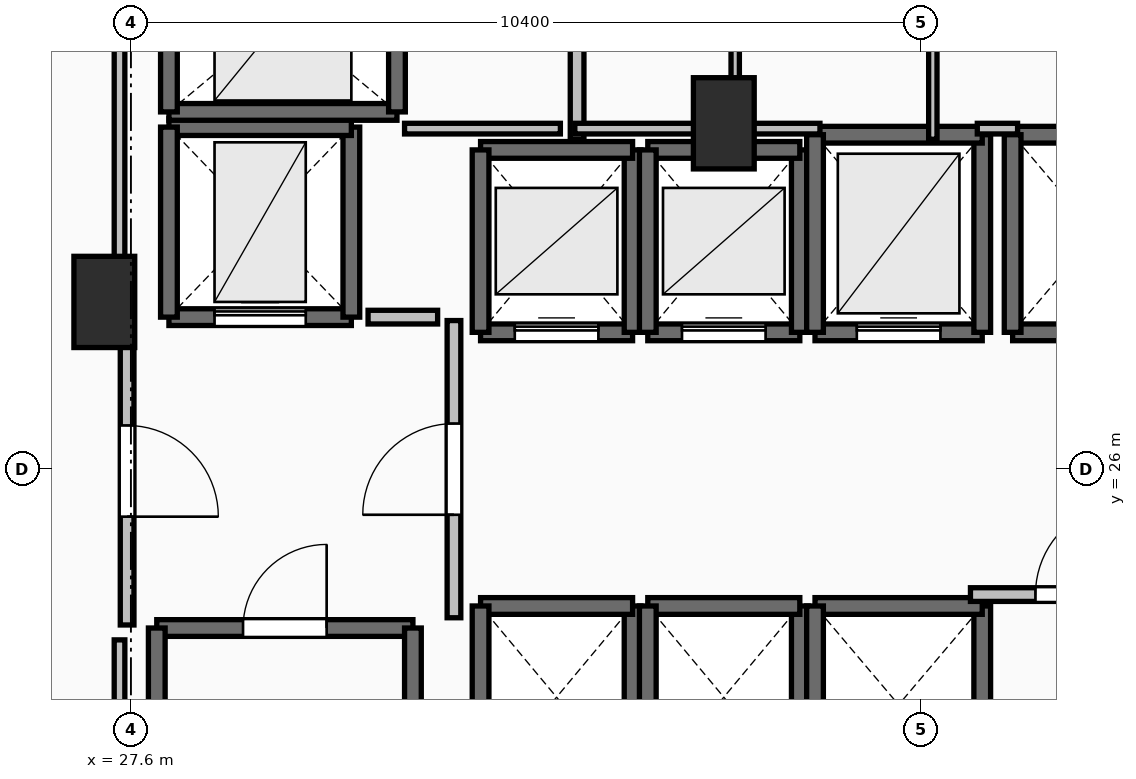
"""IFC4 building model, lengths in metres.
Left out: names, types, materials, properties, quantities, classifications, styles, units other than length and angle.
Written with IfcOpenShell. Run it as: python <this file> out.ifc"""

import sys

from ifc_helpers import new_model, si_unit, direction, frame, frame_2d, origin, origin_2d, place, context, subcontext, project, spatial, rectangle, extrude, element, fill, save


model = new_model("IFC4")
c1 = context("Model", 3, precision=1e-05, world=origin(), true_north=direction((0.0, 1.0)))
c2 = subcontext(c1, "Body", "Model", "MODEL_VIEW")
j1 = project(units=[si_unit("LENGTHUNIT", "METRE"), si_unit("PLANEANGLEUNIT", "RADIAN")], contexts=[c1])
p1 = place(None, origin())
s1 = spatial("IfcSite", under=j1, at=p1, CompositionType="ELEMENT")
p2 = place(p1, origin())
s2 = spatial("IfcBuilding", under=s1, at=p2, CompositionType="ELEMENT")
p3 = place(p2, frame((0.0, 0.0, 99.8)))
s3 = spatial("IfcBuildingStorey", under=s2, at=p3, CompositionType="ELEMENT", Elevation=99.8)
for number, where, z_axis, x_axis in (
    (1, (27.25, 28.2, 0.0), (0.0, 0.0, 1.0), (1.0, 0.0, 0.0)),
    (2, (35.4, 30.55, 0.0), (0.0, 0.0, 1.0), (1.0, 0.0, 0.0)),
):
    element("IfcColumn", number, at=place(p3, frame(where, z_axis=z_axis, x_axis=x_axis)), inside=s3, PredefinedType="PILASTER", context=c2, shape_type="SweptSolid", body=[
        extrude(rectangle(XDim=0.8, YDim=1.2, at=origin_2d()), origin(), (0.0, 0.0, 1.0), 3.5),
    ])
p4 = place(p3, frame((27.94, 23.91, 0.0), z_axis=(0.0, 0.0, 1.0), x_axis=(1.0, 0.0, 0.0)))
e3 = element("IfcWall", 3, at=p4, inside=s3, PredefinedType="SOLIDWALL", context=c2, shape_type="SweptSolid", body=[
    extrude(rectangle(XDim=3.37, YDim=0.22, at=frame_2d((1.685, 0.0))), origin(), (0.0, 0.0, 1.0), 3.24),
])
p5 = place(p4, frame((1.135, 0.0, 0.0)))
e4 = element("IfcOpeningElement", 4, at=p5, cuts=e3, PredefinedType="OPENING", context=c2, shape_type="SweptSolid", body=[
    extrude(rectangle(XDim=1.1, YDim=2.15, at=frame_2d((0.55, 1.075))), frame((0.0, 0.125, 0.0), z_axis=(0.0, -1.0, 0.0), x_axis=(1.0, 0.0, 0.0)), (0.0, 0.0, 1.0), 0.25),
])
for number, where, z_axis, x_axis in (
    (5, (31.31, 23.91, 0.0), (0.0, 0.0, 1.0), (0.0, -1.0, 0.0)),
    (6, (27.94, 16.49, 0.0), (0.0, 0.0, 1.0), (0.0, 1.0, 0.0)),
):
    element("IfcWall", number, at=place(p3, frame(where, z_axis=z_axis, x_axis=x_axis)), inside=s3, PredefinedType="SOLIDWALL", context=c2, shape_type="SweptSolid", body=[
        extrude(rectangle(XDim=7.42, YDim=0.22, at=frame_2d((3.71, 0.0))), origin(), (0.0, 0.0, 1.0), 3.24),
    ])
p6 = place(p3, frame((32.2, 27.8, 0.0), z_axis=(0.0, 0.0, 1.0), x_axis=(1.0, 0.0, 0.0)))
e7 = element("IfcWall", 7, at=p6, inside=s3, PredefinedType="SOLIDWALL", context=c2, shape_type="SweptSolid", body=[
    extrude(rectangle(XDim=2.0, YDim=0.22, at=frame_2d((1.0, 0.0))), origin(), (0.0, 0.0, 1.0), 3.24),
])
p7 = place(p6, frame((0.45, 0.0, 0.0)))
e8 = element("IfcOpeningElement", 8, at=p7, cuts=e7, PredefinedType="OPENING", context=c2, shape_type="SweptSolid", body=[
    extrude(rectangle(XDim=1.1, YDim=2.2, at=frame_2d((0.55, 1.1))), frame((0.0, 0.125, 0.0), z_axis=(0.0, -1.0, 0.0), x_axis=(1.0, 0.0, 0.0)), (0.0, 0.0, 1.0), 0.25),
])
p8 = place(p3, frame((34.2, 27.8, 0.0), z_axis=(0.0, 0.0, 1.0), x_axis=(0.0, 1.0, 0.0)))
e9 = element("IfcWall", 9, at=p8, inside=s3, PredefinedType="SOLIDWALL", context=c2, shape_type="SweptSolid", body=[
    extrude(rectangle(XDim=2.4, YDim=0.22, at=frame_2d((1.2, 0.0))), origin(), (0.0, 0.0, 1.0), 3.24),
])
p9 = place(p3, frame((34.2, 30.2, 0.0), z_axis=(0.0, 0.0, 1.0), x_axis=(-1.0, 0.0, 0.0)))
e10 = element("IfcWall", 10, at=p9, inside=s3, PredefinedType="SOLIDWALL", context=c2, shape_type="SweptSolid", body=[
    extrude(rectangle(XDim=2.0, YDim=0.22, at=frame_2d((1.0, 0.0))), origin(), (0.0, 0.0, 1.0), 3.24),
])
p10 = place(p3, frame((32.2, 30.2, 0.0), z_axis=(0.0, 0.0, 1.0), x_axis=(0.0, -1.0, 0.0)))
e11 = element("IfcWall", 11, at=p10, inside=s3, PredefinedType="SOLIDWALL", context=c2, shape_type="SweptSolid", body=[
    extrude(rectangle(XDim=2.4, YDim=0.22, at=frame_2d((1.2, 0.0))), origin(), (0.0, 0.0, 1.0), 3.24),
])
p11 = place(p3, frame((34.4, 27.8, 0.0), z_axis=(0.0, 0.0, 1.0), x_axis=(1.0, 0.0, 0.0)))
e12 = element("IfcWall", 12, at=p11, inside=s3, PredefinedType="SOLIDWALL", context=c2, shape_type="SweptSolid", body=[
    extrude(rectangle(XDim=2.0, YDim=0.22, at=frame_2d((1.0, 0.0))), origin(), (0.0, 0.0, 1.0), 3.24),
])
p12 = place(p11, frame((0.45, 0.0, 0.0)))
e13 = element("IfcOpeningElement", 13, at=p12, cuts=e12, PredefinedType="OPENING", context=c2, shape_type="SweptSolid", body=[
    extrude(rectangle(XDim=1.1, YDim=2.2, at=frame_2d((0.55, 1.1))), frame((0.0, 0.125, 0.0), z_axis=(0.0, -1.0, 0.0), x_axis=(1.0, 0.0, 0.0)), (0.0, 0.0, 1.0), 0.25),
])
p13 = place(p3, frame((36.4, 27.8, 0.0), z_axis=(0.0, 0.0, 1.0), x_axis=(0.0, 1.0, 0.0)))
e14 = element("IfcWall", 14, at=p13, inside=s3, PredefinedType="SOLIDWALL", context=c2, shape_type="SweptSolid", body=[
    extrude(rectangle(XDim=2.4, YDim=0.22, at=frame_2d((1.2, 0.0))), origin(), (0.0, 0.0, 1.0), 3.24),
])
p14 = place(p3, frame((36.4, 30.2, 0.0), z_axis=(0.0, 0.0, 1.0), x_axis=(-1.0, 0.0, 0.0)))
e15 = element("IfcWall", 15, at=p14, inside=s3, PredefinedType="SOLIDWALL", context=c2, shape_type="SweptSolid", body=[
    extrude(rectangle(XDim=2.0, YDim=0.22, at=frame_2d((1.0, 0.0))), origin(), (0.0, 0.0, 1.0), 3.24),
])
p15 = place(p3, frame((34.4, 30.2, 0.0), z_axis=(0.0, 0.0, 1.0), x_axis=(0.0, -1.0, 0.0)))
e16 = element("IfcWall", 16, at=p15, inside=s3, PredefinedType="SOLIDWALL", context=c2, shape_type="SweptSolid", body=[
    extrude(rectangle(XDim=2.4, YDim=0.22, at=frame_2d((1.2, 0.0))), origin(), (0.0, 0.0, 1.0), 3.24),
])
p16 = place(p3, frame((36.6, 27.8, 0.0), z_axis=(0.0, 0.0, 1.0), x_axis=(1.0, 0.0, 0.0)))
e17 = element("IfcWall", 17, at=p16, inside=s3, PredefinedType="SOLIDWALL", context=c2, shape_type="SweptSolid", body=[
    extrude(rectangle(XDim=2.2, YDim=0.22, at=frame_2d((1.1, 0.0))), origin(), (0.0, 0.0, 1.0), 3.24),
])
p17 = place(p16, frame((0.55, 0.0, 0.0)))
e18 = element("IfcOpeningElement", 18, at=p17, cuts=e17, PredefinedType="OPENING", context=c2, shape_type="SweptSolid", body=[
    extrude(rectangle(XDim=1.1, YDim=2.2, at=frame_2d((0.55, 1.1))), frame((0.0, 0.125, 0.0), z_axis=(0.0, -1.0, 0.0), x_axis=(1.0, 0.0, 0.0)), (0.0, 0.0, 1.0), 0.25),
])
p18 = place(p3, frame((38.8, 27.8, 0.0), z_axis=(0.0, 0.0, 1.0), x_axis=(0.0, 1.0, 0.0)))
e19 = element("IfcWall", 19, at=p18, inside=s3, PredefinedType="SOLIDWALL", context=c2, shape_type="SweptSolid", body=[
    extrude(rectangle(XDim=2.6, YDim=0.22, at=frame_2d((1.3, 0.0))), origin(), (0.0, 0.0, 1.0), 3.24),
])
p19 = place(p3, frame((38.8, 30.4, 0.0), z_axis=(0.0, 0.0, 1.0), x_axis=(-1.0, 0.0, 0.0)))
e20 = element("IfcWall", 20, at=p19, inside=s3, PredefinedType="SOLIDWALL", context=c2, shape_type="SweptSolid", body=[
    extrude(rectangle(XDim=2.2, YDim=0.22, at=frame_2d((1.1, 0.0))), origin(), (0.0, 0.0, 1.0), 3.24),
])
p20 = place(p3, frame((36.6, 30.4, 0.0), z_axis=(0.0, 0.0, 1.0), x_axis=(0.0, -1.0, 0.0)))
e21 = element("IfcWall", 21, at=p20, inside=s3, PredefinedType="SOLIDWALL", context=c2, shape_type="SweptSolid", body=[
    extrude(rectangle(XDim=2.6, YDim=0.22, at=frame_2d((1.3, 0.0))), origin(), (0.0, 0.0, 1.0), 3.24),
])
p21 = place(p3, frame((34.2, 21.8, 0.0), z_axis=(0.0, 0.0, 1.0), x_axis=(0.0, 1.0, 0.0)))
e22 = element("IfcWall", 22, at=p21, inside=s3, PredefinedType="SOLIDWALL", context=c2, shape_type="SweptSolid", body=[
    extrude(rectangle(XDim=2.4, YDim=0.22, at=frame_2d((1.2, 0.0))), origin(), (0.0, 0.0, 1.0), 3.24),
])
p22 = place(p3, frame((34.2, 24.2, 0.0), z_axis=(0.0, 0.0, 1.0), x_axis=(-1.0, 0.0, 0.0)))
e23 = element("IfcWall", 23, at=p22, inside=s3, PredefinedType="SOLIDWALL", context=c2, shape_type="SweptSolid", body=[
    extrude(rectangle(XDim=2.0, YDim=0.22, at=frame_2d((1.0, 0.0))), origin(), (0.0, 0.0, 1.0), 3.24),
])
for number, where, z_axis, x_axis in (
    (24, (32.2, 24.2, 0.0), (0.0, 0.0, 1.0), (0.0, -1.0, 0.0)),
    (25, (36.4, 21.8, 0.0), (0.0, 0.0, 1.0), (0.0, 1.0, 0.0)),
):
    element("IfcWall", number, at=place(p3, frame(where, z_axis=z_axis, x_axis=x_axis)), inside=s3, PredefinedType="SOLIDWALL", context=c2, shape_type="SweptSolid", body=[
        extrude(rectangle(XDim=2.4, YDim=0.22, at=frame_2d((1.2, 0.0))), origin(), (0.0, 0.0, 1.0), 3.24),
    ])
p23 = place(p3, frame((36.4, 24.2, 0.0), z_axis=(0.0, 0.0, 1.0), x_axis=(-1.0, 0.0, 0.0)))
e26 = element("IfcWall", 26, at=p23, inside=s3, PredefinedType="SOLIDWALL", context=c2, shape_type="SweptSolid", body=[
    extrude(rectangle(XDim=2.0, YDim=0.22, at=frame_2d((1.0, 0.0))), origin(), (0.0, 0.0, 1.0), 3.24),
])
p24 = place(p3, frame((34.4, 24.2, 0.0), z_axis=(0.0, 0.0, 1.0), x_axis=(0.0, -1.0, 0.0)))
e27 = element("IfcWall", 27, at=p24, inside=s3, PredefinedType="SOLIDWALL", context=c2, shape_type="SweptSolid", body=[
    extrude(rectangle(XDim=2.4, YDim=0.22, at=frame_2d((1.2, 0.0))), origin(), (0.0, 0.0, 1.0), 3.24),
])
p25 = place(p3, frame((38.8, 21.6, 0.0), z_axis=(0.0, 0.0, 1.0), x_axis=(0.0, 1.0, 0.0)))
e28 = element("IfcWall", 28, at=p25, inside=s3, PredefinedType="SOLIDWALL", context=c2, shape_type="SweptSolid", body=[
    extrude(rectangle(XDim=2.6, YDim=0.22, at=frame_2d((1.3, 0.0))), origin(), (0.0, 0.0, 1.0), 3.24),
])
p26 = place(p3, frame((38.8, 24.2, 0.0), z_axis=(0.0, 0.0, 1.0), x_axis=(-1.0, 0.0, 0.0)))
e29 = element("IfcWall", 29, at=p26, inside=s3, PredefinedType="SOLIDWALL", context=c2, shape_type="SweptSolid", body=[
    extrude(rectangle(XDim=2.2, YDim=0.22, at=frame_2d((1.1, 0.0))), origin(), (0.0, 0.0, 1.0), 3.24),
])
p27 = place(p3, frame((36.6, 24.2, 0.0), z_axis=(0.0, 0.0, 1.0), x_axis=(0.0, -1.0, 0.0)))
e30 = element("IfcWall", 30, at=p27, inside=s3, PredefinedType="SOLIDWALL", context=c2, shape_type="SweptSolid", body=[
    extrude(rectangle(XDim=2.6, YDim=0.22, at=frame_2d((1.3, 0.0))), origin(), (0.0, 0.0, 1.0), 3.24),
])
for number, where, z_axis, x_axis in (
    (31, (39.2, 27.8, 0.0), (0.0, 0.0, 1.0), (1.0, 0.0, 0.0)),
    (32, (41.4, 30.4, 0.0), (0.0, 0.0, 1.0), (-1.0, 0.0, 0.0)),
):
    element("IfcWall", number, at=place(p3, frame(where, z_axis=z_axis, x_axis=x_axis)), inside=s3, PredefinedType="SOLIDWALL", context=c2, shape_type="SweptSolid", body=[
        extrude(rectangle(XDim=2.2, YDim=0.22, at=frame_2d((1.1, 0.0))), origin(), (0.0, 0.0, 1.0), 3.24),
    ])
p28 = place(p3, frame((39.2, 30.4, 0.0), z_axis=(0.0, 0.0, 1.0), x_axis=(0.0, -1.0, 0.0)))
e33 = element("IfcWall", 33, at=p28, inside=s3, PredefinedType="SOLIDWALL", context=c2, shape_type="SweptSolid", body=[
    extrude(rectangle(XDim=2.6, YDim=0.22, at=frame_2d((1.3, 0.0))), origin(), (0.0, 0.0, 1.0), 3.24),
])
p29 = place(p3, frame((28.1, 28.0, 0.0), z_axis=(0.0, 0.0, 1.0), x_axis=(1.0, 0.0, 0.0)))
e34 = element("IfcWall", 34, at=p29, inside=s3, PredefinedType="SHEAR", context=c2, shape_type="SweptSolid", body=[
    extrude(rectangle(XDim=2.4, YDim=0.22, at=frame_2d((1.2, 0.0))), origin(), (0.0, 0.0, 1.0), 3.24),
])
p30 = place(p29, frame((0.6, 0.0, 0.0)))
e35 = element("IfcOpeningElement", 35, at=p30, cuts=e34, PredefinedType="OPENING", context=c2, shape_type="SweptSolid", body=[
    extrude(rectangle(XDim=1.2, YDim=2.2, at=frame_2d((0.6, 1.1))), frame((0.0, 0.125, 0.0), z_axis=(0.0, -1.0, 0.0), x_axis=(1.0, 0.0, 0.0)), (0.0, 0.0, 1.0), 0.25),
])
p31 = place(p3, frame((30.5, 28.0, 0.0), z_axis=(0.0, 0.0, 1.0), x_axis=(0.0, 1.0, 0.0)))
e36 = element("IfcWall", 36, at=p31, inside=s3, PredefinedType="SHEAR", context=c2, shape_type="SweptSolid", body=[
    extrude(rectangle(XDim=2.5, YDim=0.22, at=frame_2d((1.25, 0.0))), origin(), (0.0, 0.0, 1.0), 3.24),
])
p32 = place(p3, frame((30.5, 30.5, 0.0), z_axis=(0.0, 0.0, 1.0), x_axis=(-1.0, 0.0, 0.0)))
e37 = element("IfcWall", 37, at=p32, inside=s3, PredefinedType="SHEAR", context=c2, shape_type="SweptSolid", body=[
    extrude(rectangle(XDim=2.4, YDim=0.22, at=frame_2d((1.2, 0.0))), origin(), (0.0, 0.0, 1.0), 3.24),
])
p33 = place(p3, frame((28.1, 30.5, 0.0), z_axis=(0.0, 0.0, 1.0), x_axis=(0.0, -1.0, 0.0)))
e38 = element("IfcWall", 38, at=p33, inside=s3, PredefinedType="SHEAR", context=c2, shape_type="SweptSolid", body=[
    extrude(rectangle(XDim=2.5, YDim=0.22, at=frame_2d((1.25, 0.0))), origin(), (0.0, 0.0, 1.0), 3.24),
])
p34 = place(p3, frame((28.1, 30.7, 0.0), z_axis=(0.0, 0.0, 1.0), x_axis=(1.0, 0.0, 0.0)))
e39 = element("IfcWall", 39, at=p34, inside=s3, PredefinedType="SOLIDWALL", context=c2, shape_type="SweptSolid", body=[
    extrude(rectangle(XDim=3.0, YDim=0.22, at=frame_2d((1.5, 0.0))), origin(), (0.0, 0.0, 1.0), 3.24),
])
for number, where, z_axis, x_axis in (
    (40, (31.1, 30.7, 0.0), (0.0, 0.0, 1.0), (0.0, 1.0, 0.0)),
    (41, (28.1, 33.2, 0.0), (0.0, 0.0, 1.0), (0.0, -1.0, 0.0)),
):
    element("IfcWall", number, at=place(p3, frame(where, z_axis=z_axis, x_axis=x_axis)), inside=s3, PredefinedType="SOLIDWALL", context=c2, shape_type="SweptSolid", body=[
        extrude(rectangle(XDim=2.5, YDim=0.22, at=frame_2d((1.25, 0.0))), origin(), (0.0, 0.0, 1.0), 3.24),
    ])
p35 = place(p3, frame((31.85, 24.045, 0.0), z_axis=(0.0, 0.0, 1.0), x_axis=(0.0, 1.0, 0.0)))
e42 = element("IfcWall", 42, at=p35, inside=s3, PredefinedType="PARTITIONING", context=c2, shape_type="SweptSolid", body=[
    extrude(rectangle(XDim=3.91, YDim=0.18, at=frame_2d((1.955, 0.0))), origin(), (0.0, 0.0, 1.0), 3.24),
])
p36 = place(p35, frame((1.355, 0.0, 0.0)))
e43 = element("IfcOpeningElement", 43, at=p36, cuts=e42, PredefinedType="OPENING", context=c2, shape_type="SweptSolid", body=[
    extrude(rectangle(XDim=1.2, YDim=2.15, at=frame_2d((0.6, 1.075))), frame((0.0, 0.105, 0.0), z_axis=(0.0, -1.0, 0.0), x_axis=(1.0, 0.0, 0.0)), (0.0, 0.0, 1.0), 0.21),
])
p37 = place(p3, frame((27.55, 28.0, 0.0), z_axis=(0.0, 0.0, 1.0), x_axis=(0.0, -1.0, 0.0)))
e44 = element("IfcWall", 44, at=p37, inside=s3, PredefinedType="PARTITIONING", context=c2, shape_type="SweptSolid", body=[
    extrude(rectangle(XDim=4.05, YDim=0.18, at=frame_2d((2.025, 0.0))), origin(), (0.0, 0.0, 1.0), 3.24),
])
p38 = place(p37, frame((1.425, 0.0, 0.0)))
e45 = element("IfcOpeningElement", 45, at=p38, cuts=e44, PredefinedType="OPENING", context=c2, shape_type="SweptSolid", body=[
    extrude(rectangle(XDim=1.2, YDim=2.15, at=frame_2d((0.6, 1.075))), frame((0.0, 0.105, 0.0), z_axis=(0.0, -1.0, 0.0), x_axis=(1.0, 0.0, 0.0)), (0.0, 0.0, 1.0), 0.21),
])
p39 = place(p3, frame((33.47, 30.34, 0.0), z_axis=(0.0, 0.0, 1.0), x_axis=(0.0, 1.0, 0.0)))
e46 = element("IfcWall", 46, at=p39, inside=s3, PredefinedType="PARTITIONING", context=c2, shape_type="SweptSolid", body=[
    extrude(rectangle(XDim=3.56, YDim=0.18, at=frame_2d((1.78, 0.0))), origin(), (0.0, 0.0, 1.0), 3.24),
])
p40 = place(p3, frame((38.645, 24.35, 0.0), z_axis=(0.0, 0.0, 1.0), x_axis=(1.0, 0.0, 0.0)))
e47 = element("IfcWall", 47, at=p40, inside=s3, PredefinedType="PARTITIONING", context=c2, shape_type="SweptSolid", body=[
    extrude(rectangle(XDim=2.91, YDim=0.18, at=frame_2d((1.455, 0.0))), origin(), (0.0, 0.0, 1.0), 3.24),
])
p41 = place(p40, frame((0.855, 0.0, 0.0)))
e48 = element("IfcOpeningElement", 48, at=p41, cuts=e47, PredefinedType="OPENING", context=c2, shape_type="SweptSolid", body=[
    extrude(rectangle(XDim=1.2, YDim=2.15, at=frame_2d((0.6, 1.075))), frame((0.0, 0.105, 0.0), z_axis=(0.0, -1.0, 0.0), x_axis=(1.0, 0.0, 0.0)), (0.0, 0.0, 1.0), 0.21),
])
for number, where, z_axis, x_axis in (
    (49, (35.55, 30.34, 0.0), (0.0, 0.0, 1.0), (0.0, 1.0, 0.0)),
    (50, (38.15, 30.34, 0.0), (0.0, 0.0, 1.0), (0.0, 1.0, 0.0)),
):
    element("IfcWall", number, at=place(p3, frame(where, z_axis=z_axis, x_axis=x_axis)), inside=s3, PredefinedType="PARTITIONING", context=c2, shape_type="SweptSolid", body=[
        extrude(rectangle(XDim=3.56, YDim=0.11, at=frame_2d((1.78, 0.0))), origin(), (0.0, 0.0, 1.0), 2.432),
    ])
p42 = place(p3, frame((31.635, 28.0, 0.0), z_axis=(0.0, 0.0, 1.0), x_axis=(-1.0, 0.0, 0.0)))
e51 = element("IfcWall", 51, at=p42, inside=s3, PredefinedType="PARTITIONING", context=c2, shape_type="SweptSolid", body=[
    extrude(rectangle(XDim=0.915, YDim=0.18, at=frame_2d((0.458, 0.0))), origin(), (0.0, 0.0, 1.0), 3.24),
])
p43 = place(p3, frame((31.2, 30.48, 0.0), z_axis=(0.0, 0.0, 1.0), x_axis=(1.0, 0.0, 0.0)))
e52 = element("IfcWall", 52, at=p43, inside=s3, PredefinedType="PARTITIONING", context=c2, shape_type="SweptSolid", body=[
    extrude(rectangle(XDim=2.05, YDim=0.14, at=frame_2d((1.025, 0.0))), origin(), (0.0, 0.0, 1.0), 3.24),
])
p44 = place(p3, frame((33.44, 30.48, 0.0), z_axis=(0.0, 0.0, 1.0), x_axis=(1.0, 0.0, 0.0)))
e53 = element("IfcWall", 53, at=p44, inside=s3, PredefinedType="PARTITIONING", context=c2, shape_type="SweptSolid", body=[
    extrude(rectangle(XDim=2.14, YDim=0.14, at=frame_2d((1.07, 0.0))), origin(), (0.0, 0.0, 1.0), 2.432),
])
p45 = place(p3, frame((35.6, 30.48, 0.0), z_axis=(0.0, 0.0, 1.0), x_axis=(1.0, 0.0, 0.0)))
e54 = element("IfcWall", 54, at=p45, inside=s3, PredefinedType="PARTITIONING", context=c2, shape_type="SweptSolid", body=[
    extrude(rectangle(XDim=1.065, YDim=0.14, at=frame_2d((0.532, 0.0))), origin(), (0.0, 0.0, 1.0), 2.432),
])
p46 = place(p3, frame((38.735, 30.48, 0.0), z_axis=(0.0, 0.0, 1.0), x_axis=(1.0, 0.0, 0.0)))
e55 = element("IfcWall", 55, at=p46, inside=s3, PredefinedType="PARTITIONING", context=c2, shape_type="SweptSolid", body=[
    extrude(rectangle(XDim=0.53, YDim=0.14, at=frame_2d((0.265, 0.0))), origin(), (0.0, 0.0, 1.0), 2.432),
])
p47 = place(p3, frame((27.45, 16.24, 0.0), z_axis=(0.0, 0.0, 1.0), x_axis=(0.0, 1.0, 0.0)))
e56 = element("IfcWall", 56, at=p47, inside=s3, PredefinedType="PARTITIONING", context=c2, shape_type="SweptSolid", body=[
    extrude(rectangle(XDim=7.514, YDim=0.14, at=frame_2d((3.757, 0.0))), origin(), (0.0, 0.0, 1.0), 2.432),
])
p48 = place(p3, frame((27.45, 28.196, 0.0), z_axis=(0.0, 0.0, 1.0), x_axis=(0.0, 1.0, 0.0)))
e57 = element("IfcWall", 57, at=p48, inside=s3, PredefinedType="PARTITIONING", context=c2, shape_type="SweptSolid", body=[
    extrude(rectangle(XDim=5.254, YDim=0.14, at=frame_2d((2.627, 0.0))), origin(), (0.0, 0.0, 1.0), 2.432),
])
p49 = place(p5, origin())
e58 = element("IfcDoor", 58, at=p49, inside=s3, OperationType="SINGLE_SWING_RIGHT", PredefinedType="DOOR", context=c2, shape_type="SweptSolid", body=[
    extrude(rectangle(XDim=1.1, YDim=2.15, at=frame_2d((0.55, 1.075))), frame((0.0, 0.025, 0.0), z_axis=(0.0, -1.0, 0.0), x_axis=(1.0, 0.0, 0.0)), (0.0, 0.0, 1.0), 0.05),
])
fill(e4, e58)
p50 = place(p7, origin())
e59 = element("IfcDoor", 59, at=p50, inside=s3, OperationType="SLIDING_TO_LEFT", PredefinedType="DOOR", context=c2, shape_type="SweptSolid", body=[
    extrude(rectangle(XDim=1.1, YDim=2.2, at=frame_2d((0.55, 1.1))), frame((0.0, 0.025, 0.0), z_axis=(0.0, -1.0, 0.0), x_axis=(1.0, 0.0, 0.0)), (0.0, 0.0, 1.0), 0.05),
])
fill(e8, e59)
p51 = place(p12, origin())
e60 = element("IfcDoor", 60, at=p51, inside=s3, OperationType="SLIDING_TO_LEFT", PredefinedType="DOOR", context=c2, shape_type="SweptSolid", body=[
    extrude(rectangle(XDim=1.1, YDim=2.2, at=frame_2d((0.55, 1.1))), frame((0.0, 0.025, 0.0), z_axis=(0.0, -1.0, 0.0), x_axis=(1.0, 0.0, 0.0)), (0.0, 0.0, 1.0), 0.05),
])
fill(e13, e60)
p52 = place(p17, origin())
e61 = element("IfcDoor", 61, at=p52, inside=s3, OperationType="SLIDING_TO_LEFT", PredefinedType="DOOR", context=c2, shape_type="SweptSolid", body=[
    extrude(rectangle(XDim=1.1, YDim=2.2, at=frame_2d((0.55, 1.1))), frame((0.0, 0.025, 0.0), z_axis=(0.0, -1.0, 0.0), x_axis=(1.0, 0.0, 0.0)), (0.0, 0.0, 1.0), 0.05),
])
fill(e18, e61)
p53 = place(p30, origin())
e62 = element("IfcDoor", 62, at=p53, inside=s3, OperationType="SLIDING_TO_LEFT", PredefinedType="DOOR", context=c2, shape_type="SweptSolid", body=[
    extrude(rectangle(XDim=1.2, YDim=2.2, at=frame_2d((0.6, 1.1))), frame((0.0, 0.025, 0.0), z_axis=(0.0, -1.0, 0.0), x_axis=(1.0, 0.0, 0.0)), (0.0, 0.0, 1.0), 0.05),
])
fill(e35, e62)
p54 = place(p36, origin())
e63 = element("IfcDoor", 63, at=p54, inside=s3, OperationType="SINGLE_SWING_LEFT", PredefinedType="DOOR", context=c2, shape_type="SweptSolid", body=[
    extrude(rectangle(XDim=1.2, YDim=2.15, at=frame_2d((0.6, 1.075))), frame((0.0, 0.025, 0.0), z_axis=(0.0, -1.0, 0.0), x_axis=(1.0, 0.0, 0.0)), (0.0, 0.0, 1.0), 0.05),
])
fill(e43, e63)
p55 = place(p38, origin())
e64 = element("IfcDoor", 64, at=p55, inside=s3, OperationType="SINGLE_SWING_RIGHT", PredefinedType="DOOR", context=c2, shape_type="SweptSolid", body=[
    extrude(rectangle(XDim=1.2, YDim=2.15, at=frame_2d((0.6, 1.075))), frame((0.0, 0.025, 0.0), z_axis=(0.0, -1.0, 0.0), x_axis=(1.0, 0.0, 0.0)), (0.0, 0.0, 1.0), 0.05),
])
fill(e45, e64)
p56 = place(p41, origin())
e65 = element("IfcDoor", 65, at=p56, inside=s3, OperationType="SINGLE_SWING_RIGHT", PredefinedType="DOOR", context=c2, shape_type="SweptSolid", body=[
    extrude(rectangle(XDim=1.2, YDim=2.15, at=frame_2d((0.6, 1.075))), frame((0.0, 0.025, 0.0), z_axis=(0.0, -1.0, 0.0), x_axis=(1.0, 0.0, 0.0)), (0.0, 0.0, 1.0), 0.05),
])
fill(e48, e65)
save(model, sys.argv[1])
